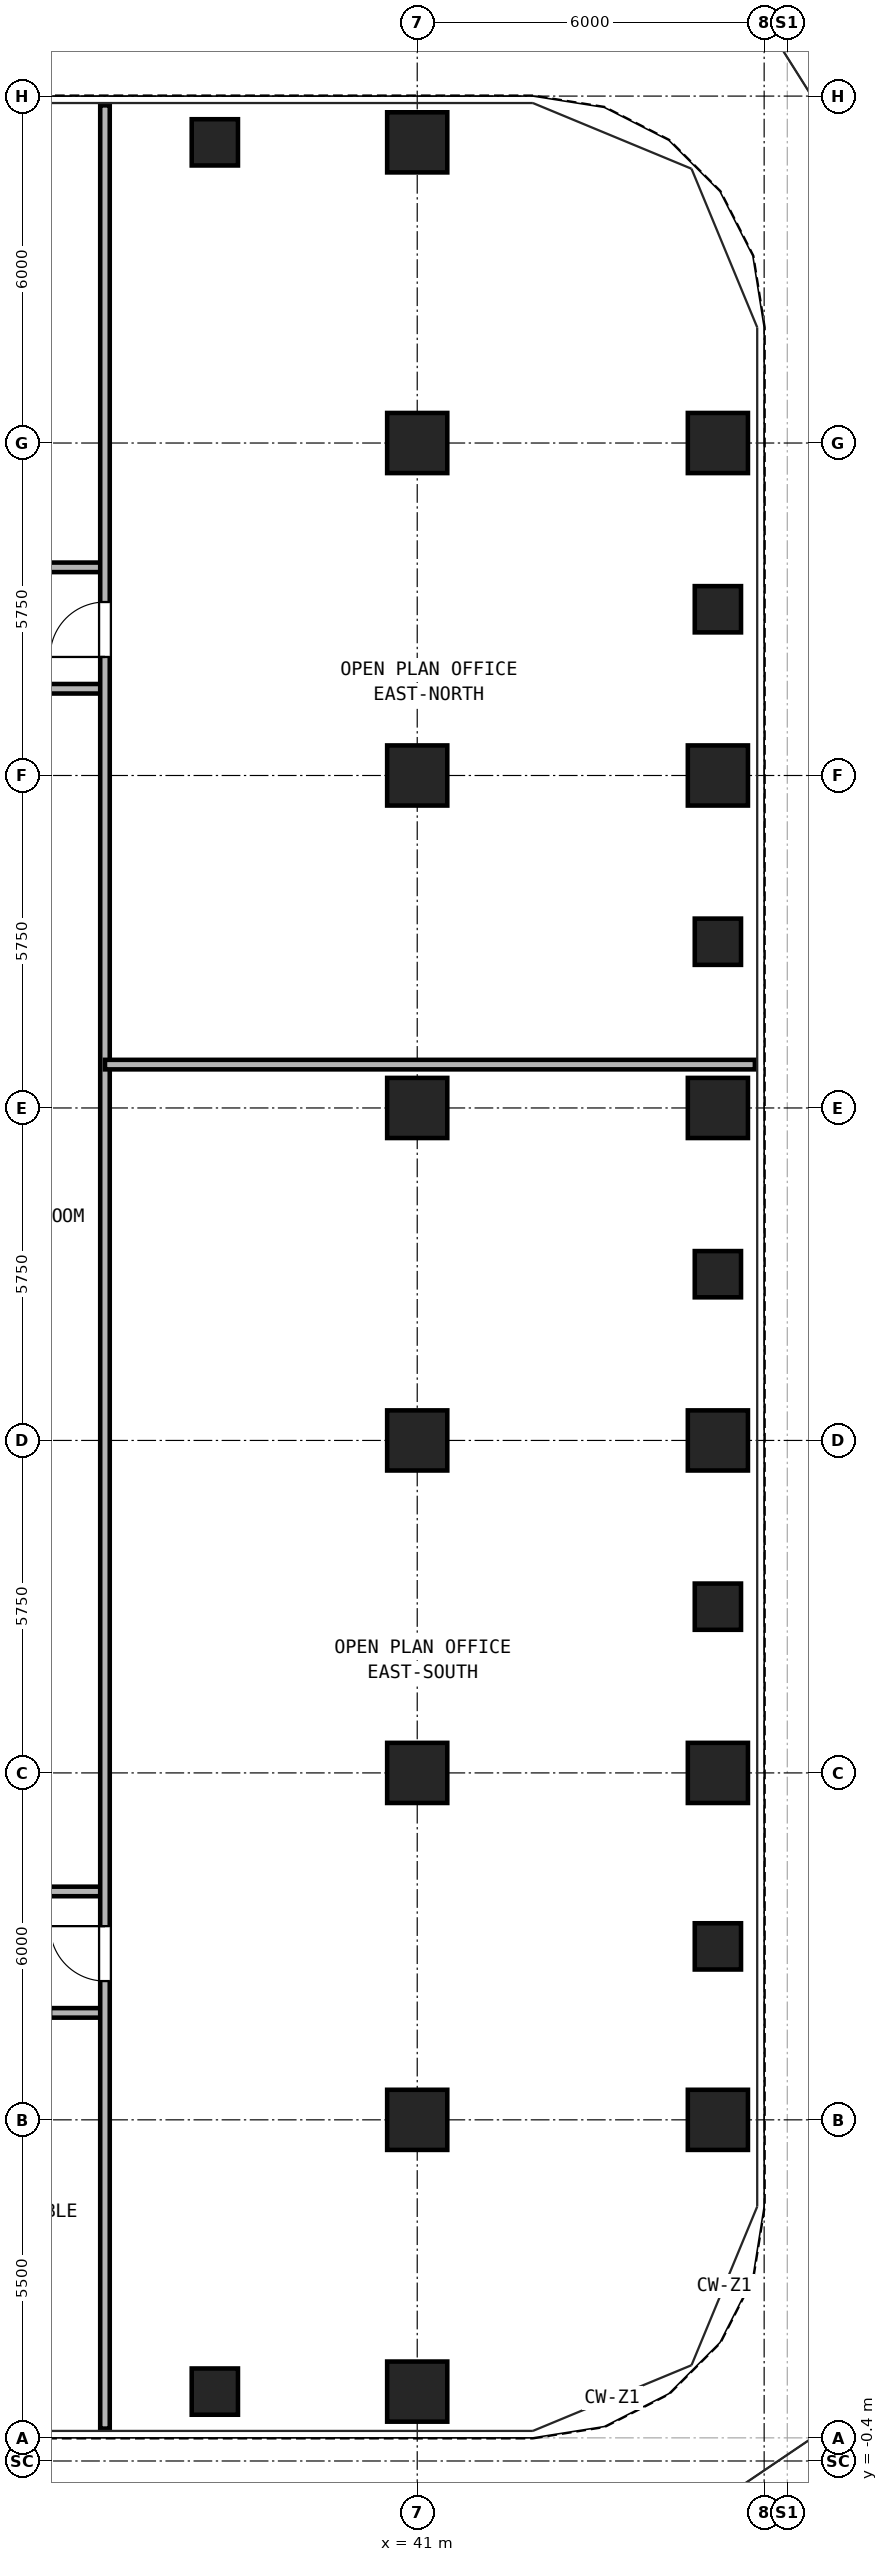
"""IFC4 building model, lengths in metres.
Left out: names, types, materials, properties, quantities, classifications, styles, units other than length and angle.
Written with IfcOpenShell. Run it as: python <this file> out.ifc"""

import sys

from ifc_helpers import new_model, si_unit, direction, frame, frame_2d, origin, origin_2d, place, context, subcontext, project, spatial, rectangle, hollow_rectangle, extrude, source, transform, mapped, element, fill, save


model = new_model("IFC4")
c1 = context("Model", 3, precision=1e-05, world=origin(), true_north=direction((0.0, 1.0)))
c2 = subcontext(c1, "Body", "Model", "MODEL_VIEW")
j1 = project(units=[si_unit("LENGTHUNIT", "METRE"), si_unit("PLANEANGLEUNIT", "RADIAN")], contexts=[c1])
p1 = place(None, origin())
s1 = spatial("IfcSite", under=j1, at=p1, CompositionType="ELEMENT")
p2 = place(p1, origin())
s2 = spatial("IfcBuilding", under=s1, at=p2, CompositionType="ELEMENT")
p3 = place(p2, frame((0.0, 0.0, 29.7)))
s3 = spatial("IfcBuildingStorey", under=s2, at=p3, CompositionType="ELEMENT", Elevation=29.7)
m1 = source(origin(), c2, "Body", "SweptSolid", [
    extrude(hollow_rectangle(XDim=1.04, YDim=1.04, WallThickness=0.065, at=origin_2d()), origin(), (0.0, 0.0, 1.0), 3.32),
])
for number, where, z_axis, x_axis in (
    (1, (41.0, 0.8, 0.0), (0.0, 0.0, 1.0), (1.0, 0.0, 0.0)),
    (2, (41.0, 39.7, 0.0), (0.0, 0.0, 1.0), (1.0, 0.0, 0.0)),
    (3, (46.2, 5.5, 0.0), (0.0, 0.0, 1.0), (1.0, 0.0, 0.0)),
    (4, (46.2, 11.5, 0.0), (0.0, 0.0, 1.0), (1.0, 0.0, 0.0)),
    (5, (46.2, 17.25, 0.0), (0.0, 0.0, 1.0), (1.0, 0.0, 0.0)),
    (6, (46.2, 23.0, 0.0), (0.0, 0.0, 1.0), (1.0, 0.0, 0.0)),
    (7, (46.2, 28.75, 0.0), (0.0, 0.0, 1.0), (1.0, 0.0, 0.0)),
    (8, (46.2, 34.5, 0.0), (0.0, 0.0, 1.0), (1.0, 0.0, 0.0)),
    (9, (41.0, 5.5, 0.0), (0.0, 0.0, 1.0), (1.0, 0.0, 0.0)),
    (10, (41.0, 11.5, 0.0), (0.0, 0.0, 1.0), (1.0, 0.0, 0.0)),
    (11, (41.0, 17.25, 0.0), (0.0, 0.0, 1.0), (1.0, 0.0, 0.0)),
    (12, (41.0, 23.0, 0.0), (0.0, 0.0, 1.0), (1.0, 0.0, 0.0)),
    (13, (41.0, 28.75, 0.0), (0.0, 0.0, 1.0), (1.0, 0.0, 0.0)),
    (14, (41.0, 34.5, 0.0), (0.0, 0.0, 1.0), (1.0, 0.0, 0.0)),
):
    element("IfcColumn", number, at=place(p3, frame(where, z_axis=z_axis, x_axis=x_axis)), inside=s3, PredefinedType="COLUMN", context=c2, shape_type="MappedRepresentation", body=[
        mapped(m1, transform((0.0, 0.0, 0.0), x_axis=(1.0, 0.0, 0.0), y_axis=(0.0, 1.0, 0.0), z_axis=(0.0, 0.0, 1.0), scale=1.0)),
    ])
m2 = source(origin(), c2, "Body", "SweptSolid", [
    extrude(hollow_rectangle(XDim=0.8, YDim=0.8, WallThickness=0.045, at=origin_2d()), origin(), (0.0, 0.0, 1.0), 3.32),
])
for number, where, z_axis, x_axis in (
    (15, (37.5, 0.8, 0.0), (0.0, 0.0, 1.0), (1.0, 0.0, 0.0)),
    (16, (37.5, 39.7, 0.0), (0.0, 0.0, 1.0), (1.0, 0.0, 0.0)),
    (17, (46.2, 8.5, 0.0), (0.0, 0.0, 1.0), (1.0, 0.0, 0.0)),
    (18, (46.2, 14.375, 0.0), (0.0, 0.0, 1.0), (1.0, 0.0, 0.0)),
    (19, (46.2, 20.125, 0.0), (0.0, 0.0, 1.0), (1.0, 0.0, 0.0)),
    (20, (46.2, 25.875, 0.0), (0.0, 0.0, 1.0), (1.0, 0.0, 0.0)),
    (21, (46.2, 31.625, 0.0), (0.0, 0.0, 1.0), (1.0, 0.0, 0.0)),
):
    element("IfcColumn", number, at=place(p3, frame(where, z_axis=z_axis, x_axis=x_axis)), inside=s3, PredefinedType="COLUMN", context=c2, shape_type="MappedRepresentation", body=[
        mapped(m2, transform((0.0, 0.0, 0.0), x_axis=(1.0, 0.0, 0.0), y_axis=(0.0, 1.0, 0.0), z_axis=(0.0, 0.0, 1.0), scale=1.0)),
    ])
p4 = place(p3, frame((11.4, 7.35, 0.0), z_axis=(0.0, 0.0, 1.0), x_axis=(1.0, 0.0, 0.0)))
e22 = element("IfcWall", 22, at=p4, inside=s3, PredefinedType="PARTITIONING", context=c2, shape_type="SweptSolid", body=[
    extrude(rectangle(XDim=24.2, YDim=0.165, at=frame_2d((12.1, 0.0))), origin(), (0.0, 0.0, 1.0), 3.32),
])
p5 = place(p4, frame((3.05, 0.0, 0.0)))
e23 = element("IfcOpeningElement", 23, at=p5, cuts=e22, PredefinedType="OPENING", context=c2, shape_type="SweptSolid", body=[
    extrude(rectangle(XDim=0.95, YDim=2.15, at=frame_2d((0.475, 1.075))), frame((0.0, 0.093, 0.0), z_axis=(0.0, -1.0, 0.0), x_axis=(1.0, 0.0, 0.0)), (0.0, 0.0, 1.0), 0.185),
])
p6 = place(p4, frame((11.6, 0.0, 0.0)))
e24 = element("IfcOpeningElement", 24, at=p6, cuts=e22, PredefinedType="OPENING", context=c2, shape_type="SweptSolid", body=[
    extrude(rectangle(XDim=0.95, YDim=2.15, at=frame_2d((0.475, 1.075))), frame((0.0, 0.093, 0.0), z_axis=(0.0, -1.0, 0.0), x_axis=(1.0, 0.0, 0.0)), (0.0, 0.0, 1.0), 0.185),
])
p7 = place(p4, frame((18.8, 0.0, 0.0)))
e25 = element("IfcOpeningElement", 25, at=p7, cuts=e22, PredefinedType="OPENING", context=c2, shape_type="SweptSolid", body=[
    extrude(rectangle(XDim=0.92, YDim=2.1, at=frame_2d((0.46, 1.05))), frame((0.0, 0.093, 0.0), z_axis=(0.0, -1.0, 0.0), x_axis=(1.0, 0.0, 0.0)), (0.0, 0.0, 1.0), 0.185),
])
p8 = place(p4, frame((22.35, 0.0, 0.0)))
e26 = element("IfcOpeningElement", 26, at=p8, cuts=e22, PredefinedType="OPENING", context=c2, shape_type="SweptSolid", body=[
    extrude(rectangle(XDim=0.92, YDim=2.1, at=frame_2d((0.46, 1.05))), frame((0.0, 0.093, 0.0), z_axis=(0.0, -1.0, 0.0), x_axis=(1.0, 0.0, 0.0)), (0.0, 0.0, 1.0), 0.185),
])
p9 = place(p3, frame((11.4, 32.35, 0.0), z_axis=(0.0, 0.0, 1.0), x_axis=(1.0, 0.0, 0.0)))
e27 = element("IfcWall", 27, at=p9, inside=s3, PredefinedType="PARTITIONING", context=c2, shape_type="SweptSolid", body=[
    extrude(rectangle(XDim=24.2, YDim=0.165, at=frame_2d((12.1, 0.0))), origin(), (0.0, 0.0, 1.0), 3.32),
])
p10 = place(p9, frame((2.7, 0.0, 0.0)))
e28 = element("IfcOpeningElement", 28, at=p10, cuts=e27, PredefinedType="OPENING", context=c2, shape_type="SweptSolid", body=[
    extrude(rectangle(XDim=0.95, YDim=2.15, at=frame_2d((0.475, 1.075))), frame((0.0, 0.093, 0.0), z_axis=(0.0, -1.0, 0.0), x_axis=(1.0, 0.0, 0.0)), (0.0, 0.0, 1.0), 0.185),
])
p11 = place(p9, frame((9.2, 0.0, 0.0)))
e29 = element("IfcOpeningElement", 29, at=p11, cuts=e27, PredefinedType="OPENING", context=c2, shape_type="SweptSolid", body=[
    extrude(rectangle(XDim=0.95, YDim=2.15, at=frame_2d((0.475, 1.075))), frame((0.0, 0.093, 0.0), z_axis=(0.0, -1.0, 0.0), x_axis=(1.0, 0.0, 0.0)), (0.0, 0.0, 1.0), 0.185),
])
p12 = place(p9, frame((15.9, 0.0, 0.0)))
e30 = element("IfcOpeningElement", 30, at=p12, cuts=e27, PredefinedType="OPENING", context=c2, shape_type="SweptSolid", body=[
    extrude(rectangle(XDim=0.95, YDim=2.15, at=frame_2d((0.475, 1.075))), frame((0.0, 0.093, 0.0), z_axis=(0.0, -1.0, 0.0), x_axis=(1.0, 0.0, 0.0)), (0.0, 0.0, 1.0), 0.185),
])
p13 = place(p9, frame((21.5, 0.0, 0.0)))
e31 = element("IfcOpeningElement", 31, at=p13, cuts=e27, PredefinedType="OPENING", context=c2, shape_type="SweptSolid", body=[
    extrude(rectangle(XDim=0.95, YDim=2.15, at=frame_2d((0.475, 1.075))), frame((0.0, 0.093, 0.0), z_axis=(0.0, -1.0, 0.0), x_axis=(1.0, 0.0, 0.0)), (0.0, 0.0, 1.0), 0.185),
])
for number, where, z_axis, x_axis in (
    (32, (30.7, 9.45, 0.0), (0.0, 0.0, 1.0), (1.0, 0.0, 0.0)),
    (33, (30.7, 30.25, 0.0), (0.0, 0.0, 1.0), (1.0, 0.0, 0.0)),
):
    element("IfcWall", number, at=place(p3, frame(where, z_axis=z_axis, x_axis=x_axis)), inside=s3, PredefinedType="PARTITIONING", context=c2, shape_type="SweptSolid", body=[
        extrude(rectangle(XDim=4.9, YDim=0.165, at=frame_2d((2.45, 0.0))), origin(), (0.0, 0.0, 1.0), 3.32),
    ])
p14 = place(p3, frame((35.6, 0.16, 0.0), z_axis=(0.0, 0.0, 1.0), x_axis=(0.0, 1.0, 0.0)))
e34 = element("IfcWall", 34, at=p14, inside=s3, PredefinedType="PARTITIONING", context=c2, shape_type="SweptSolid", body=[
    extrude(rectangle(XDim=40.18, YDim=0.165, at=frame_2d((20.09, 0.0))), origin(), (0.0, 0.0, 1.0), 3.32),
])
p15 = place(p14, frame((7.74, 0.0, 0.0)))
e35 = element("IfcOpeningElement", 35, at=p15, cuts=e34, PredefinedType="OPENING", context=c2, shape_type="SweptSolid", body=[
    extrude(rectangle(XDim=0.95, YDim=2.15, at=frame_2d((0.475, 1.075))), frame((0.0, 0.093, 0.0), z_axis=(0.0, -1.0, 0.0), x_axis=(1.0, 0.0, 0.0)), (0.0, 0.0, 1.0), 0.185),
])
p16 = place(p14, frame((30.64, 0.0, 0.0)))
e36 = element("IfcOpeningElement", 36, at=p16, cuts=e34, PredefinedType="OPENING", context=c2, shape_type="SweptSolid", body=[
    extrude(rectangle(XDim=0.95, YDim=2.15, at=frame_2d((0.475, 1.075))), frame((0.0, 0.093, 0.0), z_axis=(0.0, -1.0, 0.0), x_axis=(1.0, 0.0, 0.0)), (0.0, 0.0, 1.0), 0.185),
])
p17 = place(p3, frame((35.6, 23.75, 0.0), z_axis=(0.0, 0.0, 1.0), x_axis=(1.0, 0.0, 0.0)))
e37 = element("IfcWall", 37, at=p17, inside=s3, PredefinedType="PARTITIONING", context=c2, shape_type="SweptSolid", body=[
    extrude(rectangle(XDim=11.24, YDim=0.165, at=frame_2d((5.62, 0.0))), origin(), (0.0, 0.0, 1.0), 3.32),
])
p18 = place(p15, origin())
e38 = element("IfcDoor", 38, at=p18, inside=s3, OperationType="SINGLE_SWING_RIGHT", PredefinedType="DOOR", context=c2, shape_type="SweptSolid", body=[
    extrude(rectangle(XDim=0.95, YDim=2.15, at=frame_2d((0.475, 1.075))), frame((0.0, 0.025, 0.0), z_axis=(0.0, -1.0, 0.0), x_axis=(1.0, 0.0, 0.0)), (0.0, 0.0, 1.0), 0.05),
])
fill(e35, e38)
p19 = place(p16, origin())
e39 = element("IfcDoor", 39, at=p19, inside=s3, OperationType="SINGLE_SWING_LEFT", PredefinedType="DOOR", context=c2, shape_type="SweptSolid", body=[
    extrude(rectangle(XDim=0.95, YDim=2.15, at=frame_2d((0.475, 1.075))), frame((0.0, 0.025, 0.0), z_axis=(0.0, -1.0, 0.0), x_axis=(1.0, 0.0, 0.0)), (0.0, 0.0, 1.0), 0.05),
])
fill(e36, e39)
save(model, sys.argv[1])
